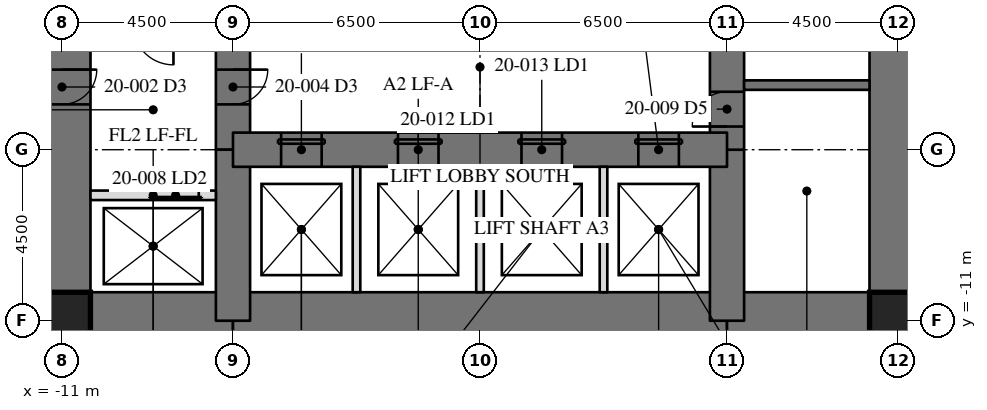
"""IFC4 building model, lengths in metres.
Left out: names, types, materials, properties, quantities, classifications, styles, units other than length and angle.
Written with IfcOpenShell. Run it as: python <this file> out.ifc"""

import sys

from ifc_helpers import new_model, si_unit, direction, frame, frame_2d, origin, origin_2d, place, context, subcontext, project, spatial, rectangle, hollow_rectangle, extrude, element, fill, save


model = new_model("IFC4")
c1 = context("Model", 3, precision=1e-05, world=origin(), true_north=direction((0.0, 1.0)))
c2 = subcontext(c1, "Body", "Model", "MODEL_VIEW")
j1 = project(units=[si_unit("LENGTHUNIT", "METRE"), si_unit("PLANEANGLEUNIT", "RADIAN")], contexts=[c1])
p1 = place(None, origin())
s1 = spatial("IfcSite", under=j1, at=p1, CompositionType="ELEMENT")
p2 = place(p1, origin())
s2 = spatial("IfcBuilding", under=s1, at=p2, CompositionType="ELEMENT")
p3 = place(p2, frame((0.0, 0.0, 85.7)))
s3 = spatial("IfcBuildingStorey", under=s2, at=p3, CompositionType="ELEMENT", Elevation=85.7)
p4 = place(p3, frame((11.0, -11.0, 0.0), z_axis=(0.0, 0.0, 1.0), x_axis=(0.0, 1.0, 0.0)))
e1 = element("IfcWall", 1, at=p4, inside=s3, PredefinedType="SHEAR", context=c2, shape_type="SweptSolid", body=[
    extrude(rectangle(XDim=22.0, YDim=1.5, at=frame_2d((11.0, 0.0))), origin(), (0.0, 0.0, 1.0), 4.1),
])
p5 = place(p4, frame((15.393, 0.0, 0.0)))
e2 = element("IfcOpeningElement", 2, at=p5, cuts=e1, PredefinedType="OPENING", context=c2, shape_type="SweptSolid", body=[
    extrude(rectangle(XDim=0.915, YDim=2.134, at=frame_2d((0.458, 1.067))), frame((0.0, 0.76, 0.0), z_axis=(0.0, -1.0, 0.0), x_axis=(1.0, 0.0, 0.0)), (0.0, 0.0, 1.0), 1.52),
])
p6 = place(p3, frame((-11.0, 11.0, 0.0), z_axis=(0.0, 0.0, 1.0), x_axis=(0.0, -1.0, 0.0)))
e3 = element("IfcWall", 3, at=p6, inside=s3, PredefinedType="SHEAR", context=c2, shape_type="SweptSolid", body=[
    extrude(rectangle(XDim=22.0, YDim=1.5, at=frame_2d((11.0, 0.0))), origin(), (0.0, 0.0, 1.0), 4.1),
])
p7 = place(p6, frame((15.393, 0.0, 0.0)))
e4 = element("IfcOpeningElement", 4, at=p7, cuts=e3, PredefinedType="OPENING", context=c2, shape_type="SweptSolid", body=[
    extrude(rectangle(XDim=0.915, YDim=2.134, at=frame_2d((0.458, 1.067))), frame((0.0, 0.76, 0.0), z_axis=(0.0, -1.0, 0.0), x_axis=(1.0, 0.0, 0.0)), (0.0, 0.0, 1.0), 1.52),
])
p8 = place(p3, frame((-11.0, -11.0, 0.0), z_axis=(0.0, 0.0, 1.0), x_axis=(1.0, 0.0, 0.0)))
e5 = element("IfcWall", 5, at=p8, inside=s3, PredefinedType="SHEAR", context=c2, shape_type="SweptSolid", body=[
    extrude(rectangle(XDim=4.5, YDim=1.5, at=frame_2d((2.25, 0.0))), origin(), (0.0, 0.0, 1.0), 4.1),
])
p9 = place(p3, frame((-6.5, -11.0, 0.0), z_axis=(0.0, 0.0, 1.0), x_axis=(1.0, 0.0, 0.0)))
e6 = element("IfcWall", 6, at=p9, inside=s3, PredefinedType="SHEAR", context=c2, shape_type="SweptSolid", body=[
    extrude(rectangle(XDim=13.0, YDim=1.5, at=frame_2d((6.5, 0.0))), origin(), (0.0, 0.0, 1.0), 4.1),
])
p10 = place(p3, frame((6.5, -11.0, 0.0), z_axis=(0.0, 0.0, 1.0), x_axis=(1.0, 0.0, 0.0)))
e7 = element("IfcWall", 7, at=p10, inside=s3, PredefinedType="SHEAR", context=c2, shape_type="SweptSolid", body=[
    extrude(rectangle(XDim=4.5, YDim=1.5, at=frame_2d((2.25, 0.0))), origin(), (0.0, 0.0, 1.0), 4.1),
])
p11 = place(p3, frame((6.5, -11.0, 0.0), z_axis=(0.0, 0.0, 1.0), x_axis=(0.0, 1.0, 0.0)))
e8 = element("IfcWall", 8, at=p11, inside=s3, PredefinedType="SHEAR", context=c2, shape_type="SweptSolid", body=[
    extrude(rectangle(XDim=4.5, YDim=0.9, at=frame_2d((2.25, 0.0))), origin(), (0.0, 0.0, 1.0), 4.1),
])
p12 = place(p3, frame((6.5, -6.5, 0.0), z_axis=(0.0, 0.0, 1.0), x_axis=(0.0, 1.0, 0.0)))
e9 = element("IfcWall", 9, at=p12, inside=s3, PredefinedType="SHEAR", context=c2, shape_type="SweptSolid", body=[
    extrude(rectangle(XDim=13.0, YDim=0.9, at=frame_2d((6.5, 0.0))), origin(), (0.0, 0.0, 1.0), 4.1),
])
p13 = place(p12, frame((10.893, 0.0, 0.0)))
e10 = element("IfcOpeningElement", 10, at=p13, cuts=e9, PredefinedType="OPENING", context=c2, shape_type="SweptSolid", body=[
    extrude(rectangle(XDim=0.915, YDim=2.134, at=frame_2d((0.458, 1.067))), frame((0.0, 0.46, 0.0), z_axis=(0.0, -1.0, 0.0), x_axis=(1.0, 0.0, 0.0)), (0.0, 0.0, 1.0), 0.92),
])
p14 = place(p12, frame((0.61, 0.0, 0.0)))
e11 = element("IfcOpeningElement", 11, at=p14, cuts=e9, PredefinedType="OPENING", context=c2, shape_type="SweptSolid", body=[
    extrude(rectangle(XDim=0.915, YDim=2.134, at=frame_2d((0.458, 1.067))), frame((0.0, 0.46, 0.0), z_axis=(0.0, -1.0, 0.0), x_axis=(1.0, 0.0, 0.0)), (0.0, 0.0, 1.0), 0.92),
])
p15 = place(p3, frame((-6.5, 6.5, 0.0), z_axis=(0.0, 0.0, 1.0), x_axis=(0.0, -1.0, 0.0)))
e12 = element("IfcWall", 12, at=p15, inside=s3, PredefinedType="SHEAR", context=c2, shape_type="SweptSolid", body=[
    extrude(rectangle(XDim=13.0, YDim=0.9, at=frame_2d((6.5, 0.0))), origin(), (0.0, 0.0, 1.0), 4.1),
])
p16 = place(p15, frame((10.893, 0.0, 0.0)))
e13 = element("IfcOpeningElement", 13, at=p16, cuts=e12, PredefinedType="OPENING", context=c2, shape_type="SweptSolid", body=[
    extrude(rectangle(XDim=0.915, YDim=2.134, at=frame_2d((0.458, 1.067))), frame((0.0, 0.46, 0.0), z_axis=(0.0, -1.0, 0.0), x_axis=(1.0, 0.0, 0.0)), (0.0, 0.0, 1.0), 0.92),
])
p17 = place(p15, frame((0.61, 0.0, 0.0)))
e14 = element("IfcOpeningElement", 14, at=p17, cuts=e12, PredefinedType="OPENING", context=c2, shape_type="SweptSolid", body=[
    extrude(rectangle(XDim=0.915, YDim=2.134, at=frame_2d((0.458, 1.067))), frame((0.0, 0.46, 0.0), z_axis=(0.0, -1.0, 0.0), x_axis=(1.0, 0.0, 0.0)), (0.0, 0.0, 1.0), 0.92),
])
p18 = place(p3, frame((-6.5, -6.5, 0.0), z_axis=(0.0, 0.0, 1.0), x_axis=(0.0, -1.0, 0.0)))
e15 = element("IfcWall", 15, at=p18, inside=s3, PredefinedType="SHEAR", context=c2, shape_type="SweptSolid", body=[
    extrude(rectangle(XDim=4.5, YDim=0.9, at=frame_2d((2.25, 0.0))), origin(), (0.0, 0.0, 1.0), 4.1),
])
p19 = place(p3, frame((-6.5, -6.5, 0.0), z_axis=(0.0, 0.0, 1.0), x_axis=(1.0, 0.0, 0.0)))
e16 = element("IfcWall", 16, at=p19, inside=s3, PredefinedType="SHEAR", context=c2, shape_type="SweptSolid", body=[
    extrude(rectangle(XDim=13.0, YDim=0.9, at=frame_2d((6.5, 0.0))), origin(), (0.0, 0.0, 1.0), 4.1),
])
p20 = place(p19, frame((1.267, 0.0, 0.0)))
e17 = element("IfcOpeningElement", 17, at=p20, cuts=e16, PredefinedType="OPENING", context=c2, shape_type="SweptSolid", body=[
    extrude(rectangle(XDim=1.067, YDim=2.134, at=frame_2d((0.533, 1.067))), frame((0.0, 0.46, 0.0), z_axis=(0.0, -1.0, 0.0), x_axis=(1.0, 0.0, 0.0)), (0.0, 0.0, 1.0), 0.92),
])
p21 = place(p19, frame((4.342, 0.0, 0.0)))
e18 = element("IfcOpeningElement", 18, at=p21, cuts=e16, PredefinedType="OPENING", context=c2, shape_type="SweptSolid", body=[
    extrude(rectangle(XDim=1.067, YDim=2.134, at=frame_2d((0.533, 1.067))), frame((0.0, 0.46, 0.0), z_axis=(0.0, -1.0, 0.0), x_axis=(1.0, 0.0, 0.0)), (0.0, 0.0, 1.0), 0.92),
])
p22 = place(p19, frame((7.592, 0.0, 0.0)))
e19 = element("IfcOpeningElement", 19, at=p22, cuts=e16, PredefinedType="OPENING", context=c2, shape_type="SweptSolid", body=[
    extrude(rectangle(XDim=1.067, YDim=2.134, at=frame_2d((0.533, 1.067))), frame((0.0, 0.46, 0.0), z_axis=(0.0, -1.0, 0.0), x_axis=(1.0, 0.0, 0.0)), (0.0, 0.0, 1.0), 0.92),
])
p23 = place(p19, frame((10.667, 0.0, 0.0)))
e20 = element("IfcOpeningElement", 20, at=p23, cuts=e16, PredefinedType="OPENING", context=c2, shape_type="SweptSolid", body=[
    extrude(rectangle(XDim=1.067, YDim=2.134, at=frame_2d((0.533, 1.067))), frame((0.0, 0.46, 0.0), z_axis=(0.0, -1.0, 0.0), x_axis=(1.0, 0.0, 0.0)), (0.0, 0.0, 1.0), 0.92),
])
for number, where, z_axis, x_axis in (
    (21, (-11.0, -11.0, 0.0), (0.0, 0.0, 1.0), (1.0, 0.0, 0.0)),
    (22, (11.0, -11.0, 0.0), (0.0, 0.0, 1.0), (1.0, 0.0, 0.0)),
):
    element("IfcColumn", number, at=place(p3, frame(where, z_axis=z_axis, x_axis=x_axis)), inside=s3, PredefinedType="COLUMN", context=c2, shape_type="SweptSolid", body=[
        extrude(hollow_rectangle(XDim=1.499, YDim=1.499, WallThickness=0.102, at=origin_2d()), origin(), (0.0, 0.0, 1.0), 4.1),
    ])
p24 = place(p3, frame((6.95, -4.8, 0.0), z_axis=(0.0, 0.0, 1.0), x_axis=(1.0, 0.0, 0.0)))
e23 = element("IfcWall", 23, at=p24, inside=s3, PredefinedType="SOLIDWALL", context=c2, shape_type="SweptSolid", body=[
    extrude(rectangle(XDim=3.3, YDim=0.25, at=frame_2d((1.65, 0.0))), origin(), (0.0, 0.0, 1.0), 3.91),
])
p25 = place(p3, frame((-6.95, -7.7, 0.0), z_axis=(0.0, 0.0, 1.0), x_axis=(-1.0, 0.0, 0.0)))
e24 = element("IfcWall", 24, at=p25, inside=s3, PredefinedType="PARTITIONING", context=c2, shape_type="SweptSolid", body=[
    extrude(rectangle(XDim=3.3, YDim=0.25, at=frame_2d((1.65, 0.0))), origin(), (0.0, 0.0, 1.0), 3.91),
])
p26 = place(p25, frame((0.45, 0.0, 0.0)))
e25 = element("IfcOpeningElement", 25, at=p26, cuts=e24, PredefinedType="OPENING", context=c2, shape_type="SweptSolid", body=[
    extrude(rectangle(XDim=1.219, YDim=2.134, at=frame_2d((0.609, 1.067))), frame((0.0, 0.135, 0.0), z_axis=(0.0, -1.0, 0.0), x_axis=(1.0, 0.0, 0.0)), (0.0, 0.0, 1.0), 0.27),
])
for number, where, z_axis, x_axis in (
    (26, (-3.25, -10.25, 0.0), (0.0, 0.0, 1.0), (0.0, 1.0, 0.0)),
    (27, (0.0, -10.25, 0.0), (0.0, 0.0, 1.0), (0.0, 1.0, 0.0)),
    (28, (3.25, -10.25, 0.0), (0.0, 0.0, 1.0), (0.0, 1.0, 0.0)),
):
    element("IfcWall", number, at=place(p3, frame(where, z_axis=z_axis, x_axis=x_axis)), inside=s3, PredefinedType="PARTITIONING", context=c2, shape_type="SweptSolid", body=[
        extrude(rectangle(XDim=3.3, YDim=0.2, at=frame_2d((1.65, 0.0))), origin(), (0.0, 0.0, 1.0), 3.91),
    ])
p27 = place(p16, origin())
e29 = element("IfcDoor", 29, at=p27, inside=s3, OperationType="SINGLE_SWING_RIGHT", PredefinedType="DOOR", context=c2, shape_type="SweptSolid", body=[
    extrude(rectangle(XDim=0.915, YDim=2.134, at=frame_2d((0.458, 1.067))), frame((0.0, -0.375, 0.0), z_axis=(0.0, -1.0, 0.0), x_axis=(1.0, 0.0, 0.0)), (0.0, 0.0, 1.0), 0.05),
])
fill(e13, e29)
p28 = place(p26, origin())
e30 = element("IfcDoor", 30, at=p28, inside=s3, OperationType="SLIDING_TO_LEFT", PredefinedType="DOOR", context=c2, shape_type="SweptSolid", body=[
    extrude(rectangle(XDim=1.219, YDim=2.134, at=frame_2d((0.609, 1.067))), frame((0.0, 0.025, 0.0), z_axis=(0.0, -1.0, 0.0), x_axis=(1.0, 0.0, 0.0)), (0.0, 0.0, 1.0), 0.05),
])
fill(e25, e30)
p29 = place(p14, origin())
e31 = element("IfcDoor", 31, at=p29, inside=s3, OperationType="SINGLE_SWING_RIGHT", PredefinedType="DOOR", context=c2, shape_type="SweptSolid", body=[
    extrude(rectangle(XDim=0.915, YDim=2.134, at=frame_2d((0.458, 1.067))), frame((0.0, -0.375, 0.0), z_axis=(0.0, -1.0, 0.0), x_axis=(1.0, 0.0, 0.0)), (0.0, 0.0, 1.0), 0.05),
])
fill(e11, e31)
p30 = place(p20, origin())
e32 = element("IfcDoor", 32, at=p30, inside=s3, OperationType="SLIDING_TO_LEFT", PredefinedType="DOOR", context=c2, shape_type="SweptSolid", body=[
    extrude(rectangle(XDim=1.067, YDim=2.134, at=frame_2d((0.533, 1.067))), frame((0.0, -0.375, 0.0), z_axis=(0.0, -1.0, 0.0), x_axis=(1.0, 0.0, 0.0)), (0.0, 0.0, 1.0), 0.05),
])
fill(e17, e32)
p31 = place(p21, origin())
e33 = element("IfcDoor", 33, at=p31, inside=s3, OperationType="SLIDING_TO_LEFT", PredefinedType="DOOR", context=c2, shape_type="SweptSolid", body=[
    extrude(rectangle(XDim=1.067, YDim=2.134, at=frame_2d((0.533, 1.067))), frame((0.0, -0.375, 0.0), z_axis=(0.0, -1.0, 0.0), x_axis=(1.0, 0.0, 0.0)), (0.0, 0.0, 1.0), 0.05),
])
fill(e18, e33)
p32 = place(p22, origin())
e34 = element("IfcDoor", 34, at=p32, inside=s3, OperationType="SLIDING_TO_LEFT", PredefinedType="DOOR", context=c2, shape_type="SweptSolid", body=[
    extrude(rectangle(XDim=1.067, YDim=2.134, at=frame_2d((0.533, 1.067))), frame((0.0, -0.375, 0.0), z_axis=(0.0, -1.0, 0.0), x_axis=(1.0, 0.0, 0.0)), (0.0, 0.0, 1.0), 0.05),
])
fill(e19, e34)
p33 = place(p23, origin())
e35 = element("IfcDoor", 35, at=p33, inside=s3, OperationType="SLIDING_TO_LEFT", PredefinedType="DOOR", context=c2, shape_type="SweptSolid", body=[
    extrude(rectangle(XDim=1.067, YDim=2.134, at=frame_2d((0.533, 1.067))), frame((0.0, -0.375, 0.0), z_axis=(0.0, -1.0, 0.0), x_axis=(1.0, 0.0, 0.0)), (0.0, 0.0, 1.0), 0.05),
])
fill(e20, e35)
save(model, sys.argv[1])
